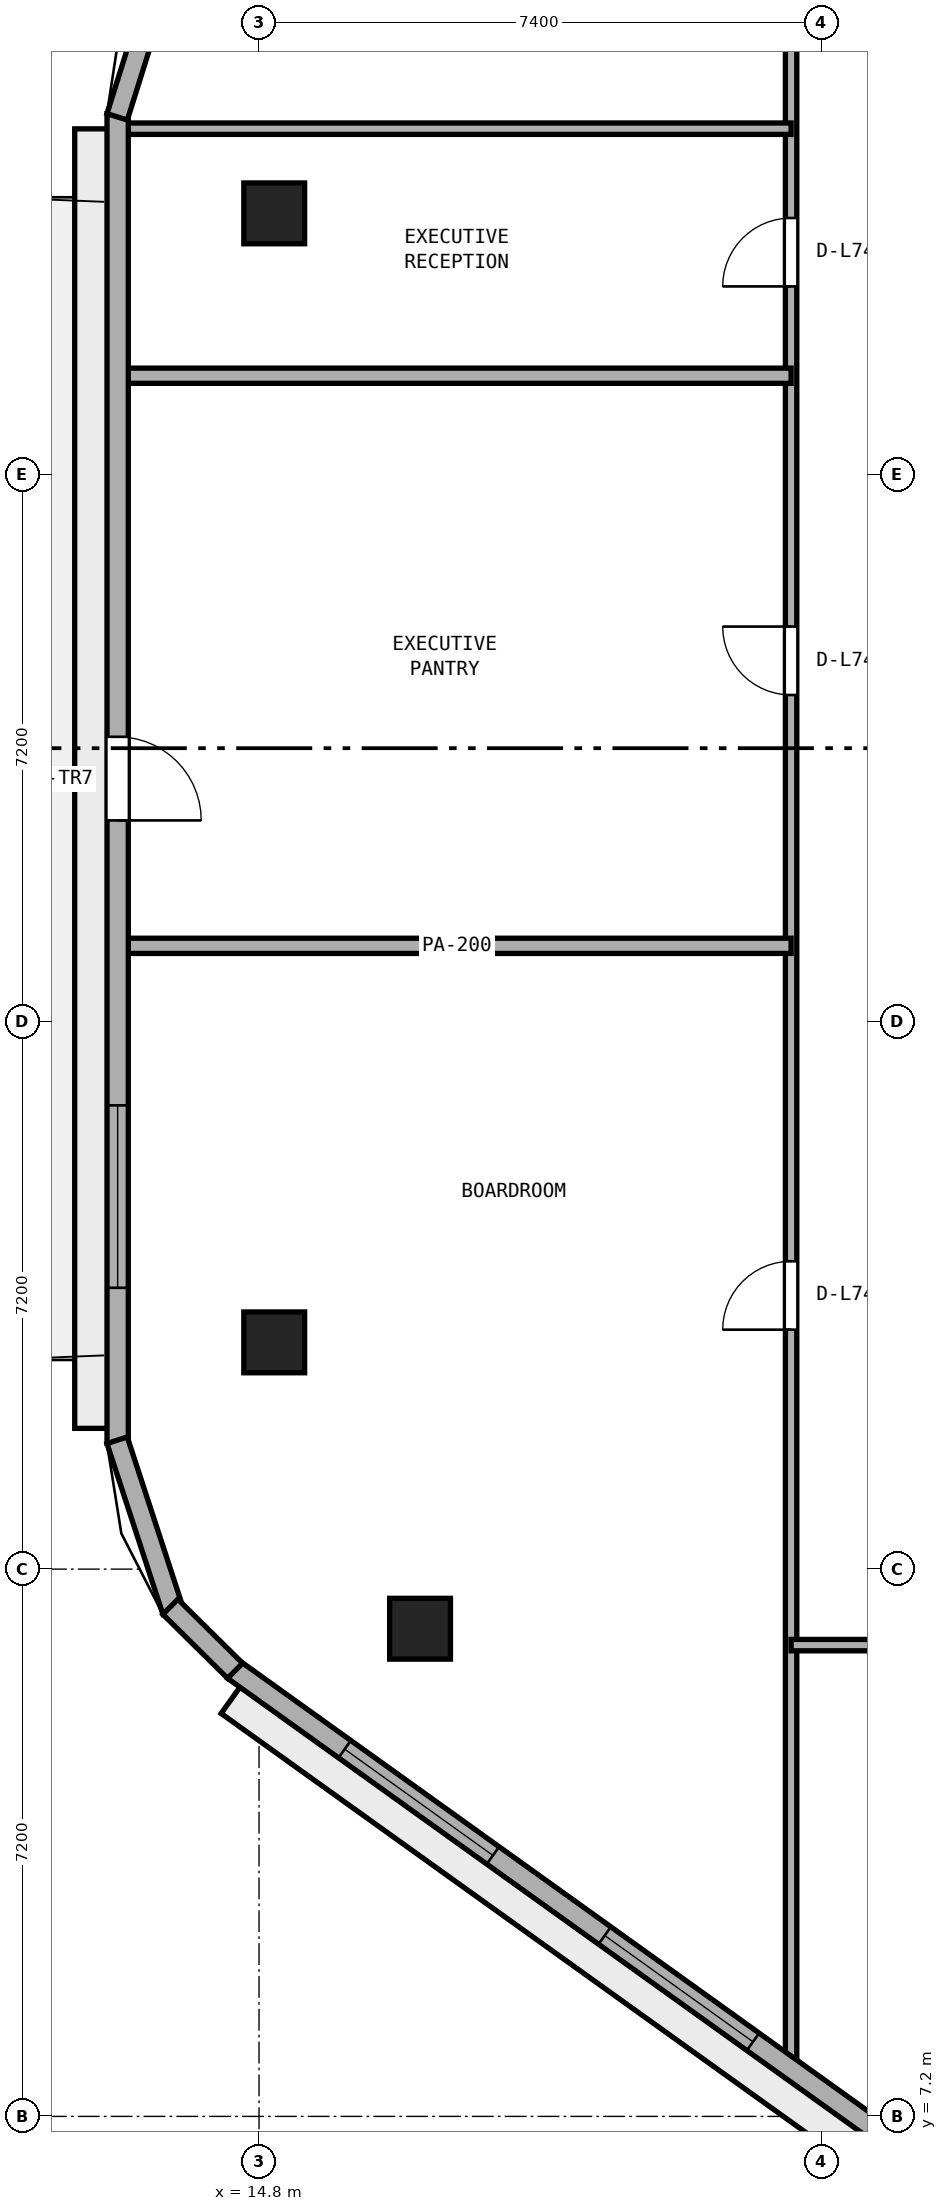
"""IFC4 building model, lengths in metres.
Left out: names, types, materials, properties, quantities, classifications, styles, units other than length and angle.
Written with IfcOpenShell. Run it as: python <this file> out.ifc"""

import sys

from ifc_helpers import new_model, si_unit, direction, frame, frame_2d, origin, origin_2d, place, context, subcontext, project, spatial, rectangle, extrude, element, fill, save


model = new_model("IFC4")
c1 = context("Model", 3, precision=1e-05, world=origin(), true_north=direction((0.0, 1.0)))
c2 = subcontext(c1, "Body", "Model", "MODEL_VIEW")
j1 = project(units=[si_unit("LENGTHUNIT", "METRE"), si_unit("PLANEANGLEUNIT", "RADIAN")], contexts=[c1])
p1 = place(None, origin())
s1 = spatial("IfcSite", under=j1, at=p1, CompositionType="ELEMENT")
p2 = place(p1, origin())
s2 = spatial("IfcBuilding", under=s1, at=p2, CompositionType="ELEMENT")
p3 = place(p2, frame((0.0, 0.0, 289.6)))
s3 = spatial("IfcBuildingStorey", under=s2, at=p3, CompositionType="ELEMENT", Elevation=289.6)
for number, where, z_axis, x_axis in (
    (1, (15.0, 32.236, 0.0), (0.0, 0.0, 1.0), (1.0, 0.0, 0.0)),
    (2, (15.0, 17.383, 0.0), (0.0, 0.0, 1.0), (1.0, 0.0, 0.0)),
    (3, (16.918, 13.616, 0.0), (0.0, 0.0, 1.0), (1.0, 0.0, 0.0)),
):
    element("IfcColumn", number, at=place(p3, frame(where, z_axis=z_axis, x_axis=x_axis)), inside=s3, PredefinedType="COLUMN", context=c2, shape_type="SweptSolid", body=[
        extrude(rectangle(XDim=0.8, YDim=0.8, at=origin_2d()), origin(), (0.0, 0.0, 1.0), 3.8),
    ])
p4 = place(p3, frame((21.8, 7.79, 0.0), z_axis=(0.0, 0.0, 1.0), x_axis=(0.0, 1.0, 0.0)))
e4 = element("IfcWall", 4, at=p4, inside=s3, PredefinedType="PARTITIONING", context=c2, shape_type="SweptSolid", body=[
    extrude(rectangle(XDim=29.21, YDim=0.15, at=frame_2d((14.605, 0.0))), origin(), (0.0, 0.0, 1.0), 3.54),
])
p5 = place(p4, frame((9.76, 0.0, 0.0)))
e5 = element("IfcOpeningElement", 5, at=p5, cuts=e4, PredefinedType="OPENING", context=c2, shape_type="SweptSolid", body=[
    extrude(rectangle(XDim=0.9, YDim=2.1, at=frame_2d((0.45, 1.05))), frame((0.0, 0.085, 0.0), z_axis=(0.0, -1.0, 0.0), x_axis=(1.0, 0.0, 0.0)), (0.0, 0.0, 1.0), 0.17),
])
p6 = place(p4, frame((18.11, 0.0, 0.0)))
e6 = element("IfcOpeningElement", 6, at=p6, cuts=e4, PredefinedType="OPENING", context=c2, shape_type="SweptSolid", body=[
    extrude(rectangle(XDim=0.9, YDim=2.1, at=frame_2d((0.45, 1.05))), frame((0.0, 0.085, 0.0), z_axis=(0.0, -1.0, 0.0), x_axis=(1.0, 0.0, 0.0)), (0.0, 0.0, 1.0), 0.17),
])
p7 = place(p4, frame((23.485, 0.0, 0.0)))
e7 = element("IfcOpeningElement", 7, at=p7, cuts=e4, PredefinedType="OPENING", context=c2, shape_type="SweptSolid", body=[
    extrude(rectangle(XDim=0.9, YDim=2.1, at=frame_2d((0.45, 1.05))), frame((0.0, 0.085, 0.0), z_axis=(0.0, -1.0, 0.0), x_axis=(1.0, 0.0, 0.0)), (0.0, 0.0, 1.0), 0.17),
])
p8 = place(p3, frame((21.8, 13.4, 0.0), z_axis=(0.0, 0.0, 1.0), x_axis=(1.0, 0.0, 0.0)))
e8 = element("IfcWall", 8, at=p8, inside=s3, PredefinedType="PARTITIONING", context=c2, shape_type="SweptSolid", body=[
    extrude(rectangle(XDim=26.8, YDim=0.15, at=frame_2d((13.4, 0.0))), origin(), (0.0, 0.0, 1.0), 3.54),
])
p9 = place(p8, frame((3.92, 0.0, 0.0)))
e9 = element("IfcOpeningElement", 9, at=p9, cuts=e8, PredefinedType="OPENING", context=c2, shape_type="SweptSolid", body=[
    extrude(rectangle(XDim=1.0, YDim=2.12, at=frame_2d((0.5, 1.06))), frame((0.0, 0.085, 0.0), z_axis=(0.0, -1.0, 0.0), x_axis=(1.0, 0.0, 0.0)), (0.0, 0.0, 1.0), 0.17),
])
p10 = place(p8, frame((13.85, 0.0, 0.0)))
e10 = element("IfcOpeningElement", 10, at=p10, cuts=e8, PredefinedType="OPENING", context=c2, shape_type="SweptSolid", body=[
    extrude(rectangle(XDim=1.0, YDim=2.12, at=frame_2d((0.5, 1.06))), frame((0.0, 0.085, 0.0), z_axis=(0.0, -1.0, 0.0), x_axis=(1.0, 0.0, 0.0)), (0.0, 0.0, 1.0), 0.17),
])
p11 = place(p8, frame((22.88, 0.0, 0.0)))
e11 = element("IfcOpeningElement", 11, at=p11, cuts=e8, PredefinedType="OPENING", context=c2, shape_type="SweptSolid", body=[
    extrude(rectangle(XDim=0.9, YDim=2.1, at=frame_2d((0.45, 1.05))), frame((0.0, 0.085, 0.0), z_axis=(0.0, -1.0, 0.0), x_axis=(1.0, 0.0, 0.0)), (0.0, 0.0, 1.0), 0.17),
])
for number, where, z_axis, x_axis in (
    (12, (13.005, 22.6, 0.0), (0.0, 0.0, 1.0), (1.0, 0.0, 0.0)),
    (13, (13.005, 30.1, 0.0), (0.0, 0.0, 1.0), (1.0, 0.0, 0.0)),
):
    element("IfcWall", number, at=place(p3, frame(where, z_axis=z_axis, x_axis=x_axis)), inside=s3, PredefinedType="PARTITIONING", context=c2, shape_type="SweptSolid", body=[
        extrude(rectangle(XDim=8.795, YDim=0.2, at=frame_2d((4.397, 0.0))), origin(), (0.0, 0.0, 1.0), 3.54),
    ])
p12 = place(p3, frame((13.005, 33.35, 0.0), z_axis=(0.0, 0.0, 1.0), x_axis=(1.0, 0.0, 0.0)))
e14 = element("IfcWall", 14, at=p12, inside=s3, PredefinedType="PARTITIONING", context=c2, shape_type="SweptSolid", body=[
    extrude(rectangle(XDim=8.795, YDim=0.15, at=frame_2d((4.397, 0.0))), origin(), (0.0, 0.0, 1.0), 3.54),
])
p13 = place(p3, frame((12.94, 33.548, 0.0), z_axis=(0.0, 0.0, 1.0), x_axis=(0.0, -1.0, 0.0)))
e15 = element("IfcWall", 15, at=p13, inside=s3, PredefinedType="STANDARD", context=c2, shape_type="SweptSolid", body=[
    extrude(rectangle(XDim=17.496, YDim=0.28, at=frame_2d((8.748, 0.0))), origin(), (0.0, 0.0, 1.0), 3.54),
])
p14 = place(p13, frame((8.198, 0.0, 0.0)))
e16 = element("IfcOpeningElement", 16, at=p14, cuts=e15, PredefinedType="OPENING", context=c2, shape_type="SweptSolid", body=[
    extrude(rectangle(XDim=1.1, YDim=2.2, at=frame_2d((0.55, 1.1))), frame((0.0, 0.15, 0.0), z_axis=(0.0, -1.0, 0.0), x_axis=(1.0, 0.0, 0.0)), (0.0, 0.0, 1.0), 0.3),
])
p15 = place(p13, frame((13.047, 0.0, 0.9)))
e17 = element("IfcOpeningElement", 17, at=p15, cuts=e15, PredefinedType="OPENING", context=c2, shape_type="SweptSolid", body=[
    extrude(rectangle(XDim=2.4, YDim=1.75, at=frame_2d((1.2, 0.875))), frame((0.0, 0.15, 0.0), z_axis=(0.0, -1.0, 0.0), x_axis=(1.0, 0.0, 0.0)), (0.0, 0.0, 1.0), 0.3),
])
p16 = place(p3, frame((14.468, 13.077, 0.0), z_axis=(0.0, 0.0, 1.0), x_axis=(0.812809888039, -0.582529042972, 0.0)))
e18 = element("IfcWall", 18, at=p16, inside=s3, PredefinedType="STANDARD", context=c2, shape_type="SweptSolid", body=[
    extrude(rectangle(XDim=15.968, YDim=0.28, at=frame_2d((7.984, 0.0))), origin(), (0.0, 0.0, 1.0), 3.54),
])
p17 = place(p16, frame((1.795, 0.0, 0.9)))
e19 = element("IfcOpeningElement", 19, at=p17, cuts=e18, PredefinedType="OPENING", context=c2, shape_type="SweptSolid", body=[
    extrude(rectangle(XDim=2.4, YDim=1.75, at=frame_2d((1.2, 0.875))), frame((0.0, 0.15, 0.0), z_axis=(0.0, -1.0, 0.0), x_axis=(1.0, 0.0, 0.0)), (0.0, 0.0, 1.0), 0.3),
])
p18 = place(p16, frame((6.004, 0.0, 0.9)))
e20 = element("IfcOpeningElement", 20, at=p18, cuts=e18, PredefinedType="OPENING", context=c2, shape_type="SweptSolid", body=[
    extrude(rectangle(XDim=2.4, YDim=1.75, at=frame_2d((1.2, 0.875))), frame((0.0, 0.15, 0.0), z_axis=(0.0, -1.0, 0.0), x_axis=(1.0, 0.0, 0.0)), (0.0, 0.0, 1.0), 0.3),
])
p19 = place(p16, frame((11.773, 0.0, 0.9)))
e21 = element("IfcOpeningElement", 21, at=p19, cuts=e18, PredefinedType="OPENING", context=c2, shape_type="SweptSolid", body=[
    extrude(rectangle(XDim=2.4, YDim=1.75, at=frame_2d((1.2, 0.875))), frame((0.0, 0.15, 0.0), z_axis=(0.0, -1.0, 0.0), x_axis=(1.0, 0.0, 0.0)), (0.0, 0.0, 1.0), 0.3),
])
p20 = place(p3, frame((13.615, 35.677, 0.0), z_axis=(0.0, 0.0, 1.0), x_axis=(-0.299374552426, -0.954135670311, 0.0)))
e22 = element("IfcWall", 22, at=p20, inside=s3, PredefinedType="STANDARD", context=c2, shape_type="SweptSolid", body=[
    extrude(rectangle(XDim=2.275, YDim=0.28, at=frame_2d((1.138, 0.0))), origin(), (0.0, 0.0, 1.0), 3.54),
])
p21 = place(p3, frame((12.933, 16.095, 0.0), z_axis=(0.0, 0.0, 1.0), x_axis=(0.3110492363, -0.950393798695, 0.0)))
e23 = element("IfcWall", 23, at=p21, inside=s3, PredefinedType="STANDARD", context=c2, shape_type="SweptSolid", body=[
    extrude(rectangle(XDim=2.364, YDim=0.28, at=frame_2d((1.182, 0.0))), origin(), (0.0, 0.0, 1.0), 3.54),
])
p22 = place(p3, frame((13.634, 13.904, 0.0), z_axis=(0.0, 0.0, 1.0), x_axis=(0.710971221429, -0.703221104845, 0.0)))
e24 = element("IfcWall", 24, at=p22, inside=s3, PredefinedType="STANDARD", context=c2, shape_type="SweptSolid", body=[
    extrude(rectangle(XDim=1.197, YDim=0.28, at=frame_2d((0.599, 0.0))), origin(), (0.0, 0.0, 1.0), 3.54),
])
p23 = place(p5, origin())
e25 = element("IfcDoor", 25, at=p23, inside=s3, OperationType="SINGLE_SWING_LEFT", PredefinedType="DOOR", context=c2, shape_type="SweptSolid", body=[
    extrude(rectangle(XDim=0.9, YDim=2.1, at=frame_2d((0.45, 1.05))), frame((0.0, 0.025, 0.0), z_axis=(0.0, -1.0, 0.0), x_axis=(1.0, 0.0, 0.0)), (0.0, 0.0, 1.0), 0.05),
])
fill(e5, e25)
p24 = place(p6, origin())
e26 = element("IfcDoor", 26, at=p24, inside=s3, OperationType="SINGLE_SWING_RIGHT", PredefinedType="DOOR", context=c2, shape_type="SweptSolid", body=[
    extrude(rectangle(XDim=0.9, YDim=2.1, at=frame_2d((0.45, 1.05))), frame((0.0, 0.025, 0.0), z_axis=(0.0, -1.0, 0.0), x_axis=(1.0, 0.0, 0.0)), (0.0, 0.0, 1.0), 0.05),
])
fill(e6, e26)
p25 = place(p7, origin())
e27 = element("IfcDoor", 27, at=p25, inside=s3, OperationType="SINGLE_SWING_LEFT", PredefinedType="DOOR", context=c2, shape_type="SweptSolid", body=[
    extrude(rectangle(XDim=0.9, YDim=2.1, at=frame_2d((0.45, 1.05))), frame((0.0, 0.025, 0.0), z_axis=(0.0, -1.0, 0.0), x_axis=(1.0, 0.0, 0.0)), (0.0, 0.0, 1.0), 0.05),
])
fill(e7, e27)
p26 = place(p14, origin())
e28 = element("IfcDoor", 28, at=p26, inside=s3, OperationType="SINGLE_SWING_RIGHT", PredefinedType="DOOR", context=c2, shape_type="SweptSolid", body=[
    extrude(rectangle(XDim=1.1, YDim=2.2, at=frame_2d((0.55, 1.1))), frame((0.0, 0.025, 0.0), z_axis=(0.0, -1.0, 0.0), x_axis=(1.0, 0.0, 0.0)), (0.0, 0.0, 1.0), 0.05),
])
fill(e16, e28)
p27 = place(p15, origin())
e29 = element("IfcWindow", 29, at=p27, inside=s3, PartitioningType="SINGLE_PANEL", PredefinedType="WINDOW", context=c2, shape_type="SweptSolid", body=[
    extrude(rectangle(XDim=2.4, YDim=1.75, at=frame_2d((1.2, 0.875))), frame((0.0, 0.03, 0.0), z_axis=(0.0, -1.0, 0.0), x_axis=(1.0, 0.0, 0.0)), (0.0, 0.0, 1.0), 0.06),
])
fill(e17, e29)
p28 = place(p17, origin())
e30 = element("IfcWindow", 30, at=p28, inside=s3, PartitioningType="SINGLE_PANEL", PredefinedType="WINDOW", context=c2, shape_type="SweptSolid", body=[
    extrude(rectangle(XDim=2.4, YDim=1.75, at=frame_2d((1.2, 0.875))), frame((0.0, 0.03, 0.0), z_axis=(0.0, -1.0, 0.0), x_axis=(1.0, 0.0, 0.0)), (0.0, 0.0, 1.0), 0.06),
])
fill(e19, e30)
p29 = place(p18, origin())
e31 = element("IfcWindow", 31, at=p29, inside=s3, PartitioningType="SINGLE_PANEL", PredefinedType="WINDOW", context=c2, shape_type="SweptSolid", body=[
    extrude(rectangle(XDim=2.4, YDim=1.75, at=frame_2d((1.2, 0.875))), frame((0.0, 0.03, 0.0), z_axis=(0.0, -1.0, 0.0), x_axis=(1.0, 0.0, 0.0)), (0.0, 0.0, 1.0), 0.06),
])
fill(e20, e31)
save(model, sys.argv[1])
